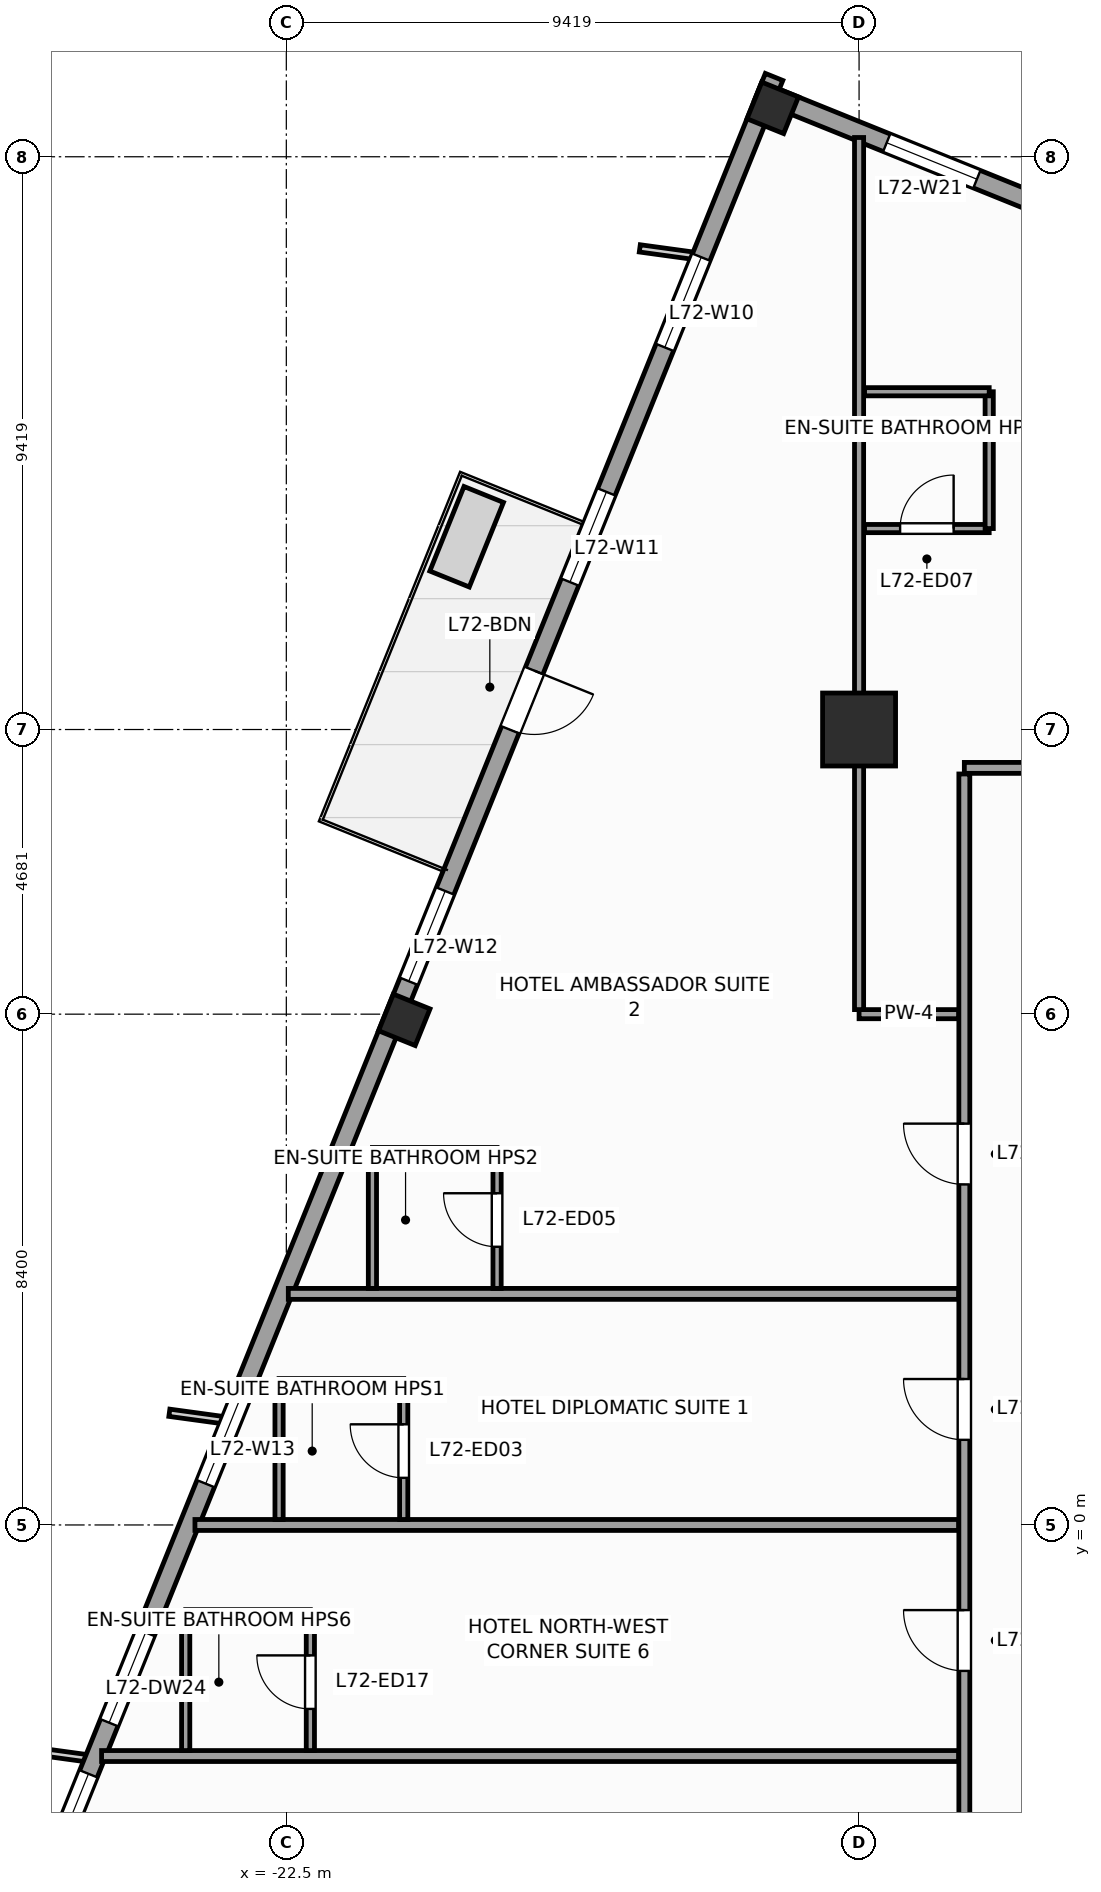
"""IFC4 building model, lengths in metres.
Left out: names, types, materials, properties, quantities, classifications, styles, units other than length and angle.
Written with IfcOpenShell. Run it as: python <this file> out.ifc"""

import sys

from ifc_helpers import new_model, si_unit, direction, frame, frame_2d, origin, origin_2d, place, context, subcontext, project, spatial, rectangle, extrude, source, transform, mapped, element, fill, save


model = new_model("IFC4")
c1 = context("Model", 3, precision=1e-05, world=origin(), true_north=direction((0.0, 1.0)))
c2 = subcontext(c1, "Body", "Model", "MODEL_VIEW")
j1 = project(units=[si_unit("LENGTHUNIT", "METRE"), si_unit("PLANEANGLEUNIT", "RADIAN")], contexts=[c1])
p1 = place(None, origin())
s1 = spatial("IfcSite", under=j1, at=p1, CompositionType="ELEMENT")
p2 = place(p1, origin())
s2 = spatial("IfcBuilding", under=s1, at=p2, CompositionType="ELEMENT")
p3 = place(p2, frame((0.0, 0.0, 294.0)))
s3 = spatial("IfcBuildingStorey", under=s2, at=p3, CompositionType="ELEMENT", Elevation=294.0)
m1 = source(origin(), c2, "Body", "SweptSolid", [
    extrude(rectangle(XDim=1.2, YDim=1.2, at=origin_2d()), origin(), (0.0, 0.0, 1.0), 3.6),
])
p4 = place(p3, frame((-13.081, 13.081, 0.0), z_axis=(0.0, 0.0, 1.0), x_axis=(1.0, 0.0, 0.0)))
e1 = element("IfcColumn", 1, at=p4, inside=s3, PredefinedType="COLUMN", context=c2, shape_type="MappedRepresentation", body=[
    mapped(m1, transform((0.0, 0.0, 0.0), scale=1.0)),
])
m2 = source(origin(), c2, "Body", "SweptSolid", [
    extrude(rectangle(XDim=0.65, YDim=0.65, at=origin_2d()), origin(), (0.0, 0.0, 1.0), 3.6),
])
for number, where, z_axis, x_axis in (
    (2, (-14.501, 23.304, 0.0), (0.0, 0.0, 1.0), (0.375, 0.927, 0.0)),
    (3, (-20.56, 8.307, 0.0), (0.0, 0.0, 1.0), (0.375, 0.927, 0.0)),
):
    element("IfcColumn", number, at=place(p3, frame(where, z_axis=z_axis, x_axis=x_axis)), inside=s3, PredefinedType="COLUMN", context=c2, shape_type="MappedRepresentation", body=[
        mapped(m2, transform((0.0, 0.0, 0.0), scale=1.0)),
    ])
p5 = place(p3, frame((-9.032, 21.278, 0.0), z_axis=(0.0, 0.0, 1.0), x_axis=(-0.927185411764, 0.374602739196, 0.0)))
e4 = element("IfcWall", 4, at=p5, inside=s3, PredefinedType="STANDARD", context=c2, shape_type="SweptSolid", body=[
    extrude(rectangle(XDim=6.155, YDim=0.31, at=frame_2d((3.078, 0.0))), origin(), (0.0, 0.0, 1.0), 3.35),
])
p6 = place(p5, frame((2.278, 0.0, 0.47)))
e5 = element("IfcOpeningElement", 5, at=p6, cuts=e4, PredefinedType="OPENING", context=c2, shape_type="SweptSolid", body=[
    extrude(rectangle(XDim=1.6, YDim=2.1, at=frame_2d((0.8, 1.05))), frame((0.0, 0.165, 0.0), z_axis=(0.0, -1.0, 0.0), x_axis=(1.0, 0.0, 0.0)), (0.0, 0.0, 1.0), 0.33),
])
p7 = place(p3, frame((-14.479, 23.813, 0.0), z_axis=(0.0, 0.0, 1.0), x_axis=(-0.374609557019, -0.927182657188, 0.0)))
e6 = element("IfcWall", 6, at=p7, inside=s3, PredefinedType="STANDARD", context=c2, shape_type="SweptSolid", body=[
    extrude(rectangle(XDim=33.31, YDim=0.31, at=frame_2d((16.655, 0.0))), origin(), (0.0, 0.0, 1.0), 2.75),
])
p8 = place(p7, frame((10.53, 0.0, 0.0)))
e7 = element("IfcOpeningElement", 7, at=p8, cuts=e6, PredefinedType="OPENING", context=c2, shape_type="SweptSolid", body=[
    extrude(rectangle(XDim=1.05, YDim=2.25, at=frame_2d((0.525, 1.125))), frame((0.0, 0.165, 0.0), z_axis=(0.0, -1.0, 0.0), x_axis=(1.0, 0.0, 0.0)), (0.0, 0.0, 1.0), 0.33),
])
p9 = place(p7, frame((3.197, 0.0, 0.47)))
e8 = element("IfcOpeningElement", 8, at=p9, cuts=e6, PredefinedType="OPENING", context=c2, shape_type="SweptSolid", body=[
    extrude(rectangle(XDim=1.6, YDim=2.1, at=frame_2d((0.8, 1.05))), frame((0.0, 0.165, 0.0), z_axis=(0.0, -1.0, 0.0), x_axis=(1.0, 0.0, 0.0)), (0.0, 0.0, 1.0), 0.33),
])
p10 = place(p7, frame((7.36, 0.0, 0.47)))
e9 = element("IfcOpeningElement", 9, at=p10, cuts=e6, PredefinedType="OPENING", context=c2, shape_type="SweptSolid", body=[
    extrude(rectangle(XDim=1.6, YDim=2.1, at=frame_2d((0.8, 1.05))), frame((0.0, 0.165, 0.0), z_axis=(0.0, -1.0, 0.0), x_axis=(1.0, 0.0, 0.0)), (0.0, 0.0, 1.0), 0.33),
])
p11 = place(p7, frame((14.439, 0.0, 0.47)))
e10 = element("IfcOpeningElement", 10, at=p11, cuts=e6, PredefinedType="OPENING", context=c2, shape_type="SweptSolid", body=[
    extrude(rectangle(XDim=1.6, YDim=2.1, at=frame_2d((0.8, 1.05))), frame((0.0, 0.165, 0.0), z_axis=(0.0, -1.0, 0.0), x_axis=(1.0, 0.0, 0.0)), (0.0, 0.0, 1.0), 0.33),
])
p12 = place(p7, frame((23.351, 0.0, 0.47)))
e11 = element("IfcOpeningElement", 11, at=p12, cuts=e6, PredefinedType="OPENING", context=c2, shape_type="SweptSolid", body=[
    extrude(rectangle(XDim=1.6, YDim=2.1, at=frame_2d((0.8, 1.05))), frame((0.0, 0.165, 0.0), z_axis=(0.0, -1.0, 0.0), x_axis=(1.0, 0.0, 0.0)), (0.0, 0.0, 1.0), 0.33),
])
p13 = place(p7, frame((30.097, 0.0, 0.47)))
e12 = element("IfcOpeningElement", 12, at=p13, cuts=e6, PredefinedType="OPENING", context=c2, shape_type="SweptSolid", body=[
    extrude(rectangle(XDim=1.6, YDim=2.1, at=frame_2d((0.8, 1.05))), frame((0.0, 0.165, 0.0), z_axis=(0.0, -1.0, 0.0), x_axis=(1.0, 0.0, 0.0)), (0.0, 0.0, 1.0), 0.33),
])
p14 = place(p7, frame((27.59, 0.0, 0.47)))
e13 = element("IfcOpeningElement", 13, at=p14, cuts=e6, PredefinedType="OPENING", context=c2, shape_type="SweptSolid", body=[
    extrude(rectangle(XDim=1.6, YDim=2.1, at=frame_2d((0.8, 1.05))), frame((0.0, 0.165, 0.0), z_axis=(0.0, -1.0, 0.0), x_axis=(1.0, 0.0, 0.0)), (0.0, 0.0, 1.0), 0.33),
])
p15 = place(p3, frame((-11.35, 12.45, 0.0), z_axis=(0.0, 0.0, 1.0), x_axis=(1.0, 0.0, 0.0)))
e14 = element("IfcWall", 14, at=p15, inside=s3, PredefinedType="PARTITIONING", context=c2, shape_type="SweptSolid", body=[
    extrude(rectangle(XDim=22.8, YDim=0.18, at=frame_2d((11.4, 0.0))), origin(), (0.0, 0.0, 1.0), 3.35),
])
p16 = place(p15, frame((6.089, 0.0, 0.0)))
e15 = element("IfcOpeningElement", 15, at=p16, cuts=e14, PredefinedType="OPENING", context=c2, shape_type="SweptSolid", body=[
    extrude(rectangle(XDim=1.0, YDim=2.15, at=frame_2d((0.5, 1.075))), frame((0.0, 0.1, 0.0), z_axis=(0.0, -1.0, 0.0), x_axis=(1.0, 0.0, 0.0)), (0.0, 0.0, 1.0), 0.2),
])
p17 = place(p15, frame((17.161, 0.0, 0.0)))
e16 = element("IfcOpeningElement", 16, at=p17, cuts=e14, PredefinedType="OPENING", context=c2, shape_type="SweptSolid", body=[
    extrude(rectangle(XDim=1.0, YDim=2.15, at=frame_2d((0.5, 1.075))), frame((0.0, 0.1, 0.0), z_axis=(0.0, -1.0, 0.0), x_axis=(1.0, 0.0, 0.0)), (0.0, 0.0, 1.0), 0.2),
])
p18 = place(p3, frame((-11.35, -10.2, 0.0), z_axis=(0.0, 0.0, 1.0), x_axis=(0.0, 1.0, 0.0)))
e17 = element("IfcWall", 17, at=p18, inside=s3, PredefinedType="PARTITIONING", context=c2, shape_type="SweptSolid", body=[
    extrude(rectangle(XDim=22.55, YDim=0.18, at=frame_2d((11.275, 0.0))), origin(), (0.0, 0.0, 1.0), 3.35),
])
p19 = place(p18, frame((11.6, 0.0, 0.0)))
e18 = element("IfcOpeningElement", 18, at=p19, cuts=e17, PredefinedType="OPENING", context=c2, shape_type="SweptSolid", body=[
    extrude(rectangle(XDim=1.0, YDim=2.15, at=frame_2d((0.5, 1.075))), frame((0.0, 0.1, 0.0), z_axis=(0.0, -1.0, 0.0), x_axis=(1.0, 0.0, 0.0)), (0.0, 0.0, 1.0), 0.2),
])
p20 = place(p18, frame((15.8, 0.0, 0.0)))
e19 = element("IfcOpeningElement", 19, at=p20, cuts=e17, PredefinedType="OPENING", context=c2, shape_type="SweptSolid", body=[
    extrude(rectangle(XDim=1.0, YDim=2.15, at=frame_2d((0.5, 1.075))), frame((0.0, 0.1, 0.0), z_axis=(0.0, -1.0, 0.0), x_axis=(1.0, 0.0, 0.0)), (0.0, 0.0, 1.0), 0.2),
])
p21 = place(p18, frame((3.6, 0.0, 0.0)))
e20 = element("IfcOpeningElement", 20, at=p21, cuts=e17, PredefinedType="OPENING", context=c2, shape_type="SweptSolid", body=[
    extrude(rectangle(XDim=1.0, YDim=2.15, at=frame_2d((0.5, 1.075))), frame((0.0, 0.1, 0.0), z_axis=(0.0, -1.0, 0.0), x_axis=(1.0, 0.0, 0.0)), (0.0, 0.0, 1.0), 0.2),
])
p22 = place(p18, frame((7.8, 0.0, 0.0)))
e21 = element("IfcOpeningElement", 21, at=p22, cuts=e17, PredefinedType="OPENING", context=c2, shape_type="SweptSolid", body=[
    extrude(rectangle(XDim=1.0, YDim=2.15, at=frame_2d((0.5, 1.075))), frame((0.0, 0.1, 0.0), z_axis=(0.0, -1.0, 0.0), x_axis=(1.0, 0.0, 0.0)), (0.0, 0.0, 1.0), 0.2),
])
p23 = place(p3, frame((-11.445, -3.8, 0.0), z_axis=(0.0, 0.0, 1.0), x_axis=(-1.0, 0.0, 0.0)))
e22 = element("IfcWall", 22, at=p23, inside=s3, PredefinedType="PARTITIONING", context=c2, shape_type="SweptSolid", body=[
    extrude(rectangle(XDim=14.093, YDim=0.18, at=frame_2d((7.046, 0.0))), origin(), (0.0, 0.0, 1.0), 3.35),
])
p24 = place(p3, frame((-11.445, 0.0, 0.0), z_axis=(0.0, 0.0, 1.0), x_axis=(-1.0, 0.0, 0.0)))
e23 = element("IfcWall", 23, at=p24, inside=s3, PredefinedType="PARTITIONING", context=c2, shape_type="SweptSolid", body=[
    extrude(rectangle(XDim=12.558, YDim=0.18, at=frame_2d((6.279, 0.0))), origin(), (0.0, 0.0, 1.0), 3.35),
])
p25 = place(p3, frame((-11.445, 3.8, 0.0), z_axis=(0.0, 0.0, 1.0), x_axis=(-1.0, 0.0, 0.0)))
e24 = element("IfcWall", 24, at=p25, inside=s3, PredefinedType="PARTITIONING", context=c2, shape_type="SweptSolid", body=[
    extrude(rectangle(XDim=11.022, YDim=0.18, at=frame_2d((5.511, 0.0))), origin(), (0.0, 0.0, 1.0), 3.35),
])
p26 = place(p3, frame((-11.445, 8.4, 0.0), z_axis=(0.0, 0.0, 1.0), x_axis=(-1.0, 0.0, 0.0)))
e25 = element("IfcWall", 25, at=p26, inside=s3, PredefinedType="PARTITIONING", context=c2, shape_type="SweptSolid", body=[
    extrude(rectangle(XDim=1.636, YDim=0.15, at=frame_2d((0.818, 0.0))), origin(), (0.0, 0.0, 1.0), 3.35),
])
p27 = place(p3, frame((-13.081, 8.475, 0.0), z_axis=(0.0, 0.0, 1.0), x_axis=(0.0, 1.0, 0.0)))
e26 = element("IfcWall", 26, at=p27, inside=s3, PredefinedType="PARTITIONING", context=c2, shape_type="SweptSolid", body=[
    extrude(rectangle(XDim=14.342, YDim=0.15, at=frame_2d((7.171, 0.0))), origin(), (0.0, 0.0, 1.0), 2.45),
])
p28 = place(p3, frame((-20.57, 0.09, 0.0), z_axis=(0.0, 0.0, 1.0), x_axis=(0.0, 1.0, 0.0)))
e27 = element("IfcWall", 27, at=p28, inside=s3, PredefinedType="PARTITIONING", context=c2, shape_type="SweptSolid", body=[
    extrude(rectangle(XDim=2.25, YDim=0.135, at=frame_2d((1.125, 0.0))), origin(), (0.0, 0.0, 1.0), 3.35),
])
p29 = place(p28, frame((0.685, 0.0, 0.0)))
e28 = element("IfcOpeningElement", 28, at=p29, cuts=e27, PredefinedType="OPENING", context=c2, shape_type="SweptSolid", body=[
    extrude(rectangle(XDim=0.88, YDim=2.1, at=frame_2d((0.44, 1.05))), frame((0.0, 0.078, 0.0), z_axis=(0.0, -1.0, 0.0), x_axis=(1.0, 0.0, 0.0)), (0.0, 0.0, 1.0), 0.155),
])
p30 = place(p3, frame((-22.619, 2.34, 0.0), z_axis=(0.0, 0.0, 1.0), x_axis=(1.0, 0.0, 0.0)))
e29 = element("IfcWall", 29, at=p30, inside=s3, PredefinedType="PARTITIONING", context=c2, shape_type="SweptSolid", body=[
    extrude(rectangle(XDim=2.05, YDim=0.135, at=frame_2d((1.025, 0.0))), origin(), (0.0, 0.0, 1.0), 3.35),
])
p31 = place(p3, frame((-22.619, 0.09, 0.0), z_axis=(0.0, 0.0, 1.0), x_axis=(0.0, 1.0, 0.0)))
e30 = element("IfcWall", 30, at=p31, inside=s3, PredefinedType="PARTITIONING", context=c2, shape_type="SweptSolid", body=[
    extrude(rectangle(XDim=2.25, YDim=0.135, at=frame_2d((1.125, 0.0))), origin(), (0.0, 0.0, 1.0), 3.35),
])
p32 = place(p3, frame((-19.034, 3.89, 0.0), z_axis=(0.0, 0.0, 1.0), x_axis=(0.0, 1.0, 0.0)))
e31 = element("IfcWall", 31, at=p32, inside=s3, PredefinedType="PARTITIONING", context=c2, shape_type="SweptSolid", body=[
    extrude(rectangle(XDim=2.25, YDim=0.135, at=frame_2d((1.125, 0.0))), origin(), (0.0, 0.0, 1.0), 3.35),
])
p33 = place(p32, frame((0.685, 0.0, 0.0)))
e32 = element("IfcOpeningElement", 32, at=p33, cuts=e31, PredefinedType="OPENING", context=c2, shape_type="SweptSolid", body=[
    extrude(rectangle(XDim=0.88, YDim=2.1, at=frame_2d((0.44, 1.05))), frame((0.0, 0.078, 0.0), z_axis=(0.0, -1.0, 0.0), x_axis=(1.0, 0.0, 0.0)), (0.0, 0.0, 1.0), 0.155),
])
p34 = place(p3, frame((-21.084, 6.14, 0.0), z_axis=(0.0, 0.0, 1.0), x_axis=(1.0, 0.0, 0.0)))
e33 = element("IfcWall", 33, at=p34, inside=s3, PredefinedType="PARTITIONING", context=c2, shape_type="SweptSolid", body=[
    extrude(rectangle(XDim=2.05, YDim=0.135, at=frame_2d((1.025, 0.0))), origin(), (0.0, 0.0, 1.0), 3.35),
])
p35 = place(p3, frame((-21.084, 3.89, 0.0), z_axis=(0.0, 0.0, 1.0), x_axis=(0.0, 1.0, 0.0)))
e34 = element("IfcWall", 34, at=p35, inside=s3, PredefinedType="PARTITIONING", context=c2, shape_type="SweptSolid", body=[
    extrude(rectangle(XDim=2.25, YDim=0.135, at=frame_2d((1.125, 0.0))), origin(), (0.0, 0.0, 1.0), 3.35),
])
p36 = place(p3, frame((-12.991, 16.386, 0.0), z_axis=(0.0, 0.0, 1.0), x_axis=(1.0, 0.0, 0.0)))
e35 = element("IfcWall", 35, at=p36, inside=s3, PredefinedType="PARTITIONING", context=c2, shape_type="SweptSolid", body=[
    extrude(rectangle(XDim=2.05, YDim=0.135, at=frame_2d((1.025, 0.0))), origin(), (0.0, 0.0, 1.0), 3.35),
])
p37 = place(p36, frame((0.585, 0.0, 0.0)))
e36 = element("IfcOpeningElement", 36, at=p37, cuts=e35, PredefinedType="OPENING", context=c2, shape_type="SweptSolid", body=[
    extrude(rectangle(XDim=0.88, YDim=2.1, at=frame_2d((0.44, 1.05))), frame((0.0, 0.078, 0.0), z_axis=(0.0, -1.0, 0.0), x_axis=(1.0, 0.0, 0.0)), (0.0, 0.0, 1.0), 0.155),
])
p38 = place(p3, frame((-10.941, 16.386, 0.0), z_axis=(0.0, 0.0, 1.0), x_axis=(0.0, 1.0, 0.0)))
e37 = element("IfcWall", 37, at=p38, inside=s3, PredefinedType="PARTITIONING", context=c2, shape_type="SweptSolid", body=[
    extrude(rectangle(XDim=2.25, YDim=0.135, at=frame_2d((1.125, 0.0))), origin(), (0.0, 0.0, 1.0), 3.35),
])
p39 = place(p3, frame((-12.991, 18.636, 0.0), z_axis=(0.0, 0.0, 1.0), x_axis=(1.0, 0.0, 0.0)))
e38 = element("IfcWall", 38, at=p39, inside=s3, PredefinedType="PARTITIONING", context=c2, shape_type="SweptSolid", body=[
    extrude(rectangle(XDim=2.05, YDim=0.135, at=frame_2d((1.025, 0.0))), origin(), (0.0, 0.0, 1.0), 3.35),
])
p40 = place(p3, frame((-22.105, -3.71, 0.0), z_axis=(0.0, 0.0, 1.0), x_axis=(0.0, 1.0, 0.0)))
e39 = element("IfcWall", 39, at=p40, inside=s3, PredefinedType="PARTITIONING", context=c2, shape_type="SweptSolid", body=[
    extrude(rectangle(XDim=2.25, YDim=0.135, at=frame_2d((1.125, 0.0))), origin(), (0.0, 0.0, 1.0), 3.35),
])
p41 = place(p40, frame((0.685, 0.0, 0.0)))
e40 = element("IfcOpeningElement", 40, at=p41, cuts=e39, PredefinedType="OPENING", context=c2, shape_type="SweptSolid", body=[
    extrude(rectangle(XDim=0.88, YDim=2.1, at=frame_2d((0.44, 1.05))), frame((0.0, 0.078, 0.0), z_axis=(0.0, -1.0, 0.0), x_axis=(1.0, 0.0, 0.0)), (0.0, 0.0, 1.0), 0.155),
])
p42 = place(p3, frame((-24.155, -1.46, 0.0), z_axis=(0.0, 0.0, 1.0), x_axis=(1.0, 0.0, 0.0)))
e41 = element("IfcWall", 41, at=p42, inside=s3, PredefinedType="PARTITIONING", context=c2, shape_type="SweptSolid", body=[
    extrude(rectangle(XDim=2.05, YDim=0.135, at=frame_2d((1.025, 0.0))), origin(), (0.0, 0.0, 1.0), 3.35),
])
p43 = place(p3, frame((-24.155, -3.71, 0.0), z_axis=(0.0, 0.0, 1.0), x_axis=(0.0, 1.0, 0.0)))
e42 = element("IfcWall", 42, at=p43, inside=s3, PredefinedType="PARTITIONING", context=c2, shape_type="SweptSolid", body=[
    extrude(rectangle(XDim=2.25, YDim=0.135, at=frame_2d((1.125, 0.0))), origin(), (0.0, 0.0, 1.0), 3.35),
])
m3 = source(origin(), c2, "Body", "SweptSolid", [
    extrude(rectangle(XDim=1.05, YDim=2.25, at=frame_2d((0.525, 1.125))), frame((0.0, 0.025, 0.0), z_axis=(0.0, -1.0, 0.0), x_axis=(1.0, 0.0, 0.0)), (0.0, 0.0, 1.0), 0.05),
])
p44 = place(p8, origin())
e43 = element("IfcDoor", 43, at=p44, inside=s3, OperationType="SINGLE_SWING_LEFT", PredefinedType="DOOR", context=c2, shape_type="MappedRepresentation", body=[
    mapped(m3, transform((0.0, 0.0, 0.0), scale=1.0)),
])
fill(e7, e43)
m4 = source(origin(), c2, "Body", "SweptSolid", [
    extrude(rectangle(XDim=1.6, YDim=2.1, at=frame_2d((0.8, 1.05))), frame((0.0, 0.03, 0.0), z_axis=(0.0, -1.0, 0.0), x_axis=(1.0, 0.0, 0.0)), (0.0, 0.0, 1.0), 0.06),
])
p45 = place(p9, origin())
e44 = element("IfcWindow", 44, at=p45, inside=s3, PartitioningType="SINGLE_PANEL", PredefinedType="WINDOW", context=c2, shape_type="MappedRepresentation", body=[
    mapped(m4, transform((0.0, 0.0, 0.0), scale=1.0)),
])
fill(e8, e44)
p46 = place(p10, origin())
e45 = element("IfcWindow", 45, at=p46, inside=s3, PartitioningType="SINGLE_PANEL", PredefinedType="WINDOW", context=c2, shape_type="MappedRepresentation", body=[
    mapped(m4, transform((0.0, 0.0, 0.0), scale=1.0)),
])
fill(e9, e45)
p47 = place(p11, origin())
e46 = element("IfcWindow", 46, at=p47, inside=s3, PartitioningType="SINGLE_PANEL", PredefinedType="WINDOW", context=c2, shape_type="MappedRepresentation", body=[
    mapped(m4, transform((0.0, 0.0, 0.0), scale=1.0)),
])
fill(e10, e46)
p48 = place(p12, origin())
e47 = element("IfcWindow", 47, at=p48, inside=s3, PartitioningType="SINGLE_PANEL", PredefinedType="WINDOW", context=c2, shape_type="MappedRepresentation", body=[
    mapped(m4, transform((0.0, 0.0, 0.0), scale=1.0)),
])
fill(e11, e47)
p49 = place(p13, origin())
e48 = element("IfcWindow", 48, at=p49, inside=s3, PartitioningType="SINGLE_PANEL", PredefinedType="WINDOW", context=c2, shape_type="MappedRepresentation", body=[
    mapped(m4, transform((0.0, 0.0, 0.0), scale=1.0)),
])
fill(e12, e48)
p50 = place(p6, origin())
e49 = element("IfcWindow", 49, at=p50, inside=s3, PartitioningType="SINGLE_PANEL", PredefinedType="WINDOW", context=c2, shape_type="MappedRepresentation", body=[
    mapped(m4, transform((0.0, 0.0, 0.0), scale=1.0)),
])
fill(e5, e49)
m5 = source(origin(), c2, "Body", "SweptSolid", [
    extrude(rectangle(XDim=1.0, YDim=2.15, at=frame_2d((0.5, 1.075))), frame((0.0, 0.025, 0.0), z_axis=(0.0, -1.0, 0.0), x_axis=(1.0, 0.0, 0.0)), (0.0, 0.0, 1.0), 0.05),
])
p51 = place(p19, origin())
e50 = element("IfcDoor", 50, at=p51, inside=s3, OperationType="SINGLE_SWING_RIGHT", PredefinedType="DOOR", context=c2, shape_type="MappedRepresentation", body=[
    mapped(m5, transform((0.0, 0.0, 0.0), scale=1.0)),
])
fill(e18, e50)
m6 = source(origin(), c2, "Body", "SweptSolid", [
    extrude(rectangle(XDim=0.88, YDim=2.1, at=frame_2d((0.44, 1.05))), frame((0.0, 0.025, 0.0), z_axis=(0.0, -1.0, 0.0), x_axis=(1.0, 0.0, 0.0)), (0.0, 0.0, 1.0), 0.05),
])
p52 = place(p29, origin())
e51 = element("IfcDoor", 51, at=p52, inside=s3, OperationType="SINGLE_SWING_RIGHT", PredefinedType="DOOR", context=c2, shape_type="MappedRepresentation", body=[
    mapped(m6, transform((0.0, 0.0, 0.0), scale=1.0)),
])
fill(e28, e51)
p53 = place(p20, origin())
e52 = element("IfcDoor", 52, at=p53, inside=s3, OperationType="SINGLE_SWING_RIGHT", PredefinedType="DOOR", context=c2, shape_type="MappedRepresentation", body=[
    mapped(m5, transform((0.0, 0.0, 0.0), scale=1.0)),
])
fill(e19, e52)
p54 = place(p33, origin())
e53 = element("IfcDoor", 53, at=p54, inside=s3, OperationType="SINGLE_SWING_RIGHT", PredefinedType="DOOR", context=c2, shape_type="MappedRepresentation", body=[
    mapped(m6, transform((0.0, 0.0, 0.0), scale=1.0)),
])
fill(e32, e53)
p55 = place(p37, origin())
e54 = element("IfcDoor", 54, at=p55, inside=s3, OperationType="SINGLE_SWING_RIGHT", PredefinedType="DOOR", context=c2, shape_type="MappedRepresentation", body=[
    mapped(m6, transform((0.0, 0.0, 0.0), scale=1.0)),
])
fill(e36, e54)
p56 = place(p22, origin())
e55 = element("IfcDoor", 55, at=p56, inside=s3, OperationType="SINGLE_SWING_RIGHT", PredefinedType="DOOR", context=c2, shape_type="MappedRepresentation", body=[
    mapped(m5, transform((0.0, 0.0, 0.0), scale=1.0)),
])
fill(e21, e55)
p57 = place(p41, origin())
e56 = element("IfcDoor", 56, at=p57, inside=s3, OperationType="SINGLE_SWING_RIGHT", PredefinedType="DOOR", context=c2, shape_type="MappedRepresentation", body=[
    mapped(m6, transform((0.0, 0.0, 0.0), scale=1.0)),
])
fill(e40, e56)
p58 = place(p14, origin())
e57 = element("IfcWindow", 57, at=p58, inside=s3, PartitioningType="SINGLE_PANEL", PredefinedType="WINDOW", context=c2, shape_type="MappedRepresentation", body=[
    mapped(m4, transform((0.0, 0.0, 0.0), scale=1.0)),
])
fill(e13, e57)
save(model, sys.argv[1])
